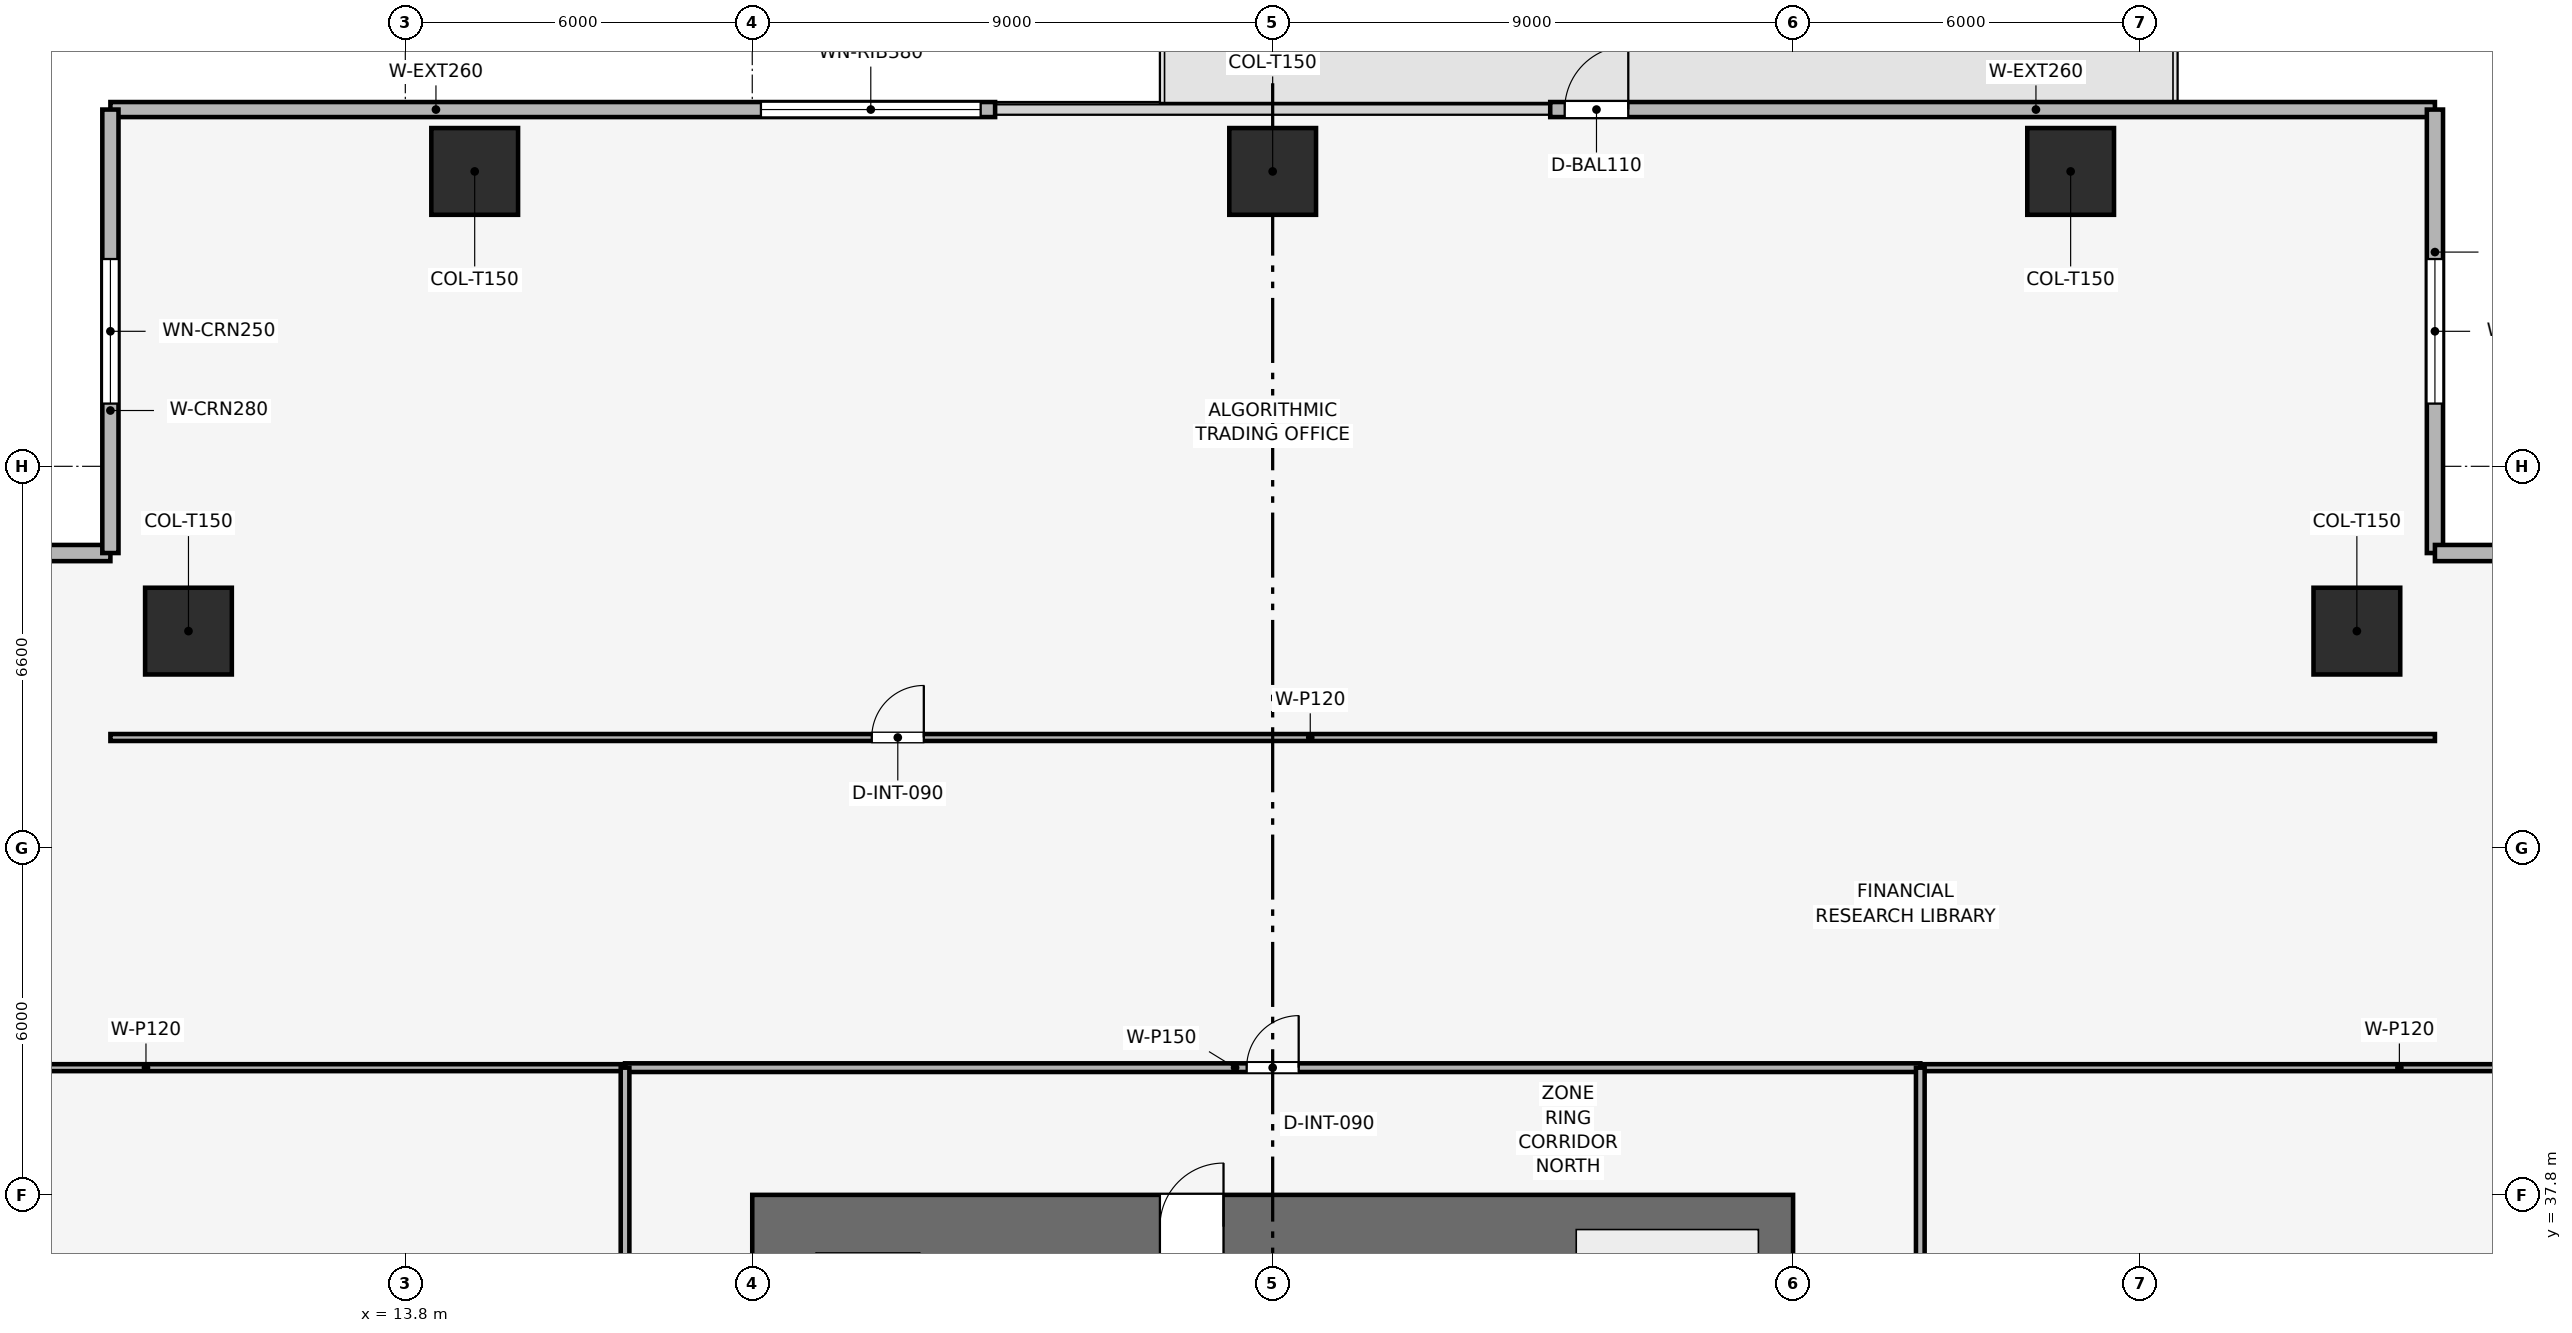
"""IFC4 building model, lengths in metres.
Left out: names, types, materials, properties, quantities, classifications, styles, units other than length and angle.
Written with IfcOpenShell. Run it as: python <this file> out.ifc"""

import sys

from ifc_helpers import new_model, si_unit, direction, frame, frame_2d, origin, origin_2d, place, context, subcontext, project, spatial, rectangle, extrude, element, fill, save


model = new_model("IFC4")
c1 = context("Model", 3, precision=1e-05, world=origin(), true_north=direction((0.0, 1.0)))
c2 = subcontext(c1, "Body", "Model", "MODEL_VIEW")
j1 = project(units=[si_unit("LENGTHUNIT", "METRE"), si_unit("PLANEANGLEUNIT", "RADIAN")], contexts=[c1])
p1 = place(None, origin())
s1 = spatial("IfcSite", under=j1, at=p1, CompositionType="ELEMENT")
p2 = place(p1, origin())
s2 = spatial("IfcBuilding", under=s1, at=p2, CompositionType="ELEMENT")
p3 = place(p2, frame((0.0, 0.0, 65.1)))
s3 = spatial("IfcBuildingStorey", under=s2, at=p3, CompositionType="ELEMENT", Elevation=65.1)
p4 = place(p3, frame((19.8, 37.25, 0.0), z_axis=(0.0, 0.0, 1.0), x_axis=(1.0, 0.0, 0.0)))
e1 = element("IfcWall", 1, at=p4, inside=s3, PredefinedType="SHEAR", context=c2, shape_type="SweptSolid", body=[
    extrude(rectangle(XDim=18.0, YDim=1.1, at=frame_2d((9.0, 0.0))), origin(), (0.0, 0.0, 1.0), 3.9),
])
p5 = place(p4, frame((7.05, 0.0, 0.0)))
e2 = element("IfcOpeningElement", 2, at=p5, cuts=e1, PredefinedType="OPENING", context=c2, shape_type="SweptSolid", body=[
    extrude(rectangle(XDim=1.1, YDim=2.15, at=frame_2d((0.55, 1.075))), frame((0.0, 0.56, 0.0), z_axis=(0.0, -1.0, 0.0), x_axis=(1.0, 0.0, 0.0)), (0.0, 0.0, 1.0), 1.12),
])
for number, where, z_axis, x_axis in (
    (3, (42.6, 55.5, 0.003), (0.0, 0.0, 1.0), (1.0, 0.0, 0.0)),
    (4, (28.8, 55.5, 0.003), (0.0, 0.0, 1.0), (1.0, 0.0, 0.0)),
    (5, (15.0, 55.5, 0.003), (0.0, 0.0, 1.0), (1.0, 0.0, 0.0)),
    (6, (47.55, 47.55, 0.003), (0.0, 0.0, 1.0), (1.0, 0.0, 0.0)),
    (7, (10.05, 47.55, 0.003), (0.0, 0.0, 1.0), (1.0, 0.0, 0.0)),
):
    element("IfcColumn", number, at=place(p3, frame(where, z_axis=z_axis, x_axis=x_axis)), inside=s3, PredefinedType="COLUMN", context=c2, shape_type="SweptSolid", body=[
        extrude(rectangle(XDim=1.5, YDim=1.5, at=origin_2d()), origin(), (0.0, 0.0, 1.0), 3.644),
    ])
p6 = place(p3, frame((8.7, 56.57, 0.0), z_axis=(0.0, 0.0, 1.0), x_axis=(1.0, 0.0, 0.0)))
e8 = element("IfcWall", 8, at=p6, inside=s3, PredefinedType="SOLIDWALL", context=c2, shape_type="SweptSolid", body=[
    extrude(rectangle(XDim=15.3, YDim=0.26, at=frame_2d((7.65, 0.0))), origin(), (0.0, 0.0, 1.0), 3.65),
])
p7 = place(p6, frame((11.25, 0.0, 0.9)))
e9 = element("IfcOpeningElement", 9, at=p7, cuts=e8, PredefinedType="OPENING", context=c2, shape_type="SweptSolid", body=[
    extrude(rectangle(XDim=3.8, YDim=1.9, at=frame_2d((1.9, 0.95))), frame((0.0, 0.14, 0.0), z_axis=(0.0, -1.0, 0.0), x_axis=(1.0, 0.0, 0.0)), (0.0, 0.0, 1.0), 0.28),
])
p8 = place(p3, frame((33.6, 56.57, 0.0), z_axis=(0.0, 0.0, 1.0), x_axis=(1.0, 0.0, 0.0)))
e10 = element("IfcWall", 10, at=p8, inside=s3, PredefinedType="SOLIDWALL", context=c2, shape_type="SweptSolid", body=[
    extrude(rectangle(XDim=15.3, YDim=0.26, at=frame_2d((7.65, 0.0))), origin(), (0.0, 0.0, 1.0), 3.65),
])
p9 = place(p8, frame((0.25, 0.0, 0.0)))
e11 = element("IfcOpeningElement", 11, at=p9, cuts=e10, PredefinedType="OPENING", context=c2, shape_type="SweptSolid", body=[
    extrude(rectangle(XDim=1.1, YDim=2.2, at=frame_2d((0.55, 1.1))), frame((0.0, 0.14, 0.0), z_axis=(0.0, -1.0, 0.0), x_axis=(1.0, 0.0, 0.0)), (0.0, 0.0, 1.0), 0.28),
])
p10 = place(p3, frame((1.03, 48.9, 0.0), z_axis=(0.0, 0.0, 1.0), x_axis=(1.0, 0.0, 0.0)))
e12 = element("IfcWall", 12, at=p10, inside=s3, PredefinedType="SOLIDWALL", context=c2, shape_type="SweptSolid", body=[
    extrude(rectangle(XDim=7.67, YDim=0.28, at=frame_2d((3.835, 0.0))), origin(), (0.0, 0.0, 1.0), 3.65),
])
p11 = place(p10, frame((2.585, 0.0, 0.9)))
e13 = element("IfcOpeningElement", 13, at=p11, cuts=e12, PredefinedType="OPENING", context=c2, shape_type="SweptSolid", body=[
    extrude(rectangle(XDim=2.5, YDim=1.9, at=frame_2d((1.25, 0.95))), frame((0.0, 0.15, 0.0), z_axis=(0.0, -1.0, 0.0), x_axis=(1.0, 0.0, 0.0)), (0.0, 0.0, 1.0), 0.3),
])
p12 = place(p3, frame((8.7, 48.9, 0.0), z_axis=(0.0, 0.0, 1.0), x_axis=(0.0, 1.0, 0.0)))
e14 = element("IfcWall", 14, at=p12, inside=s3, PredefinedType="SOLIDWALL", context=c2, shape_type="SweptSolid", body=[
    extrude(rectangle(XDim=7.67, YDim=0.28, at=frame_2d((3.835, 0.0))), origin(), (0.0, 0.0, 1.0), 3.65),
])
p13 = place(p12, frame((2.585, 0.0, 0.9)))
e15 = element("IfcOpeningElement", 15, at=p13, cuts=e14, PredefinedType="OPENING", context=c2, shape_type="SweptSolid", body=[
    extrude(rectangle(XDim=2.5, YDim=1.9, at=frame_2d((1.25, 0.95))), frame((0.0, 0.15, 0.0), z_axis=(0.0, -1.0, 0.0), x_axis=(1.0, 0.0, 0.0)), (0.0, 0.0, 1.0), 0.3),
])
p14 = place(p3, frame((48.9, 56.57, 0.0), z_axis=(0.0, 0.0, 1.0), x_axis=(0.0, -1.0, 0.0)))
e16 = element("IfcWall", 16, at=p14, inside=s3, PredefinedType="SOLIDWALL", context=c2, shape_type="SweptSolid", body=[
    extrude(rectangle(XDim=7.67, YDim=0.28, at=frame_2d((3.835, 0.0))), origin(), (0.0, 0.0, 1.0), 3.65),
])
p15 = place(p14, frame((2.585, 0.0, 0.9)))
e17 = element("IfcOpeningElement", 17, at=p15, cuts=e16, PredefinedType="OPENING", context=c2, shape_type="SweptSolid", body=[
    extrude(rectangle(XDim=2.5, YDim=1.9, at=frame_2d((1.25, 0.95))), frame((0.0, 0.15, 0.0), z_axis=(0.0, -1.0, 0.0), x_axis=(1.0, 0.0, 0.0)), (0.0, 0.0, 1.0), 0.3),
])
p16 = place(p3, frame((48.9, 48.9, 0.0), z_axis=(0.0, 0.0, 1.0), x_axis=(1.0, 0.0, 0.0)))
e18 = element("IfcWall", 18, at=p16, inside=s3, PredefinedType="SOLIDWALL", context=c2, shape_type="SweptSolid", body=[
    extrude(rectangle(XDim=7.67, YDim=0.28, at=frame_2d((3.835, 0.0))), origin(), (0.0, 0.0, 1.0), 3.65),
])
p17 = place(p16, frame((2.585, 0.0, 0.9)))
e19 = element("IfcOpeningElement", 19, at=p17, cuts=e18, PredefinedType="OPENING", context=c2, shape_type="SweptSolid", body=[
    extrude(rectangle(XDim=2.5, YDim=1.9, at=frame_2d((1.25, 0.95))), frame((0.0, 0.15, 0.0), z_axis=(0.0, -1.0, 0.0), x_axis=(1.0, 0.0, 0.0)), (0.0, 0.0, 1.0), 0.3),
])
p18 = place(p3, frame((8.7, 45.71, 0.0), z_axis=(0.0, 0.0, 1.0), x_axis=(1.0, 0.0, 0.0)))
e20 = element("IfcWall", 20, at=p18, inside=s3, PredefinedType="PARTITIONING", context=c2, shape_type="SweptSolid", body=[
    extrude(rectangle(XDim=40.2, YDim=0.12, at=frame_2d((20.1, 0.0))), origin(), (0.0, 0.0, 1.0), 3.085),
])
p19 = place(p18, frame((13.167, 0.0, 0.0)))
e21 = element("IfcOpeningElement", 21, at=p19, cuts=e20, PredefinedType="OPENING", context=c2, shape_type="SweptSolid", body=[
    extrude(rectangle(XDim=0.9, YDim=2.1, at=frame_2d((0.45, 1.05))), frame((0.0, 0.07, 0.0), z_axis=(0.0, -1.0, 0.0), x_axis=(1.0, 0.0, 0.0)), (0.0, 0.0, 1.0), 0.14),
])
for number, where, z_axis, x_axis in (
    (22, (1.03, 40.0, 0.0), (0.0, 0.0, 1.0), (1.0, 0.0, 0.0)),
    (23, (40.0, 40.0, 0.0), (0.0, 0.0, 1.0), (1.0, 0.0, 0.0)),
):
    element("IfcWall", number, at=place(p3, frame(where, z_axis=z_axis, x_axis=x_axis)), inside=s3, PredefinedType="PARTITIONING", context=c2, shape_type="SweptSolid", body=[
        extrude(rectangle(XDim=16.57, YDim=0.12, at=frame_2d((8.285, 0.0))), origin(), (0.0, 0.0, 1.0), 2.935),
    ])
p20 = place(p3, frame((17.6, 40.0, 0.0), z_axis=(0.0, 0.0, 1.0), x_axis=(1.0, 0.0, 0.0)))
e24 = element("IfcWall", 24, at=p20, inside=s3, PredefinedType="PARTITIONING", context=c2, shape_type="SweptSolid", body=[
    extrude(rectangle(XDim=22.4, YDim=0.15, at=frame_2d((11.2, 0.0))), origin(), (0.0, 0.0, 1.0), 3.085),
])
p21 = place(p20, frame((10.75, 0.0, 0.0)))
e25 = element("IfcOpeningElement", 25, at=p21, cuts=e24, PredefinedType="OPENING", context=c2, shape_type="SweptSolid", body=[
    extrude(rectangle(XDim=0.9, YDim=2.1, at=frame_2d((0.45, 1.05))), frame((0.0, 0.085, 0.0), z_axis=(0.0, -1.0, 0.0), x_axis=(1.0, 0.0, 0.0)), (0.0, 0.0, 1.0), 0.17),
])
p22 = place(p3, frame((17.6, 17.6, 0.0), z_axis=(0.0, 0.0, 1.0), x_axis=(0.0, 1.0, 0.0)))
e26 = element("IfcWall", 26, at=p22, inside=s3, PredefinedType="PARTITIONING", context=c2, shape_type="SweptSolid", body=[
    extrude(rectangle(XDim=22.4, YDim=0.15, at=frame_2d((11.2, 0.0))), origin(), (0.0, 0.0, 1.0), 3.085),
])
p23 = place(p22, frame((0.7, 0.0, 0.0)))
e27 = element("IfcOpeningElement", 27, at=p23, cuts=e26, PredefinedType="OPENING", context=c2, shape_type="SweptSolid", body=[
    extrude(rectangle(XDim=0.9, YDim=2.1, at=frame_2d((0.45, 1.05))), frame((0.0, 0.085, 0.0), z_axis=(0.0, -1.0, 0.0), x_axis=(1.0, 0.0, 0.0)), (0.0, 0.0, 1.0), 0.17),
])
p24 = place(p22, frame((6.365, 0.0, 0.0)))
e28 = element("IfcOpeningElement", 28, at=p24, cuts=e26, PredefinedType="OPENING", context=c2, shape_type="SweptSolid", body=[
    extrude(rectangle(XDim=0.9, YDim=2.1, at=frame_2d((0.45, 1.05))), frame((0.0, 0.085, 0.0), z_axis=(0.0, -1.0, 0.0), x_axis=(1.0, 0.0, 0.0)), (0.0, 0.0, 1.0), 0.17),
])
p25 = place(p22, frame((16.415, 0.0, 0.0)))
e29 = element("IfcOpeningElement", 29, at=p25, cuts=e26, PredefinedType="OPENING", context=c2, shape_type="SweptSolid", body=[
    extrude(rectangle(XDim=0.9, YDim=2.1, at=frame_2d((0.45, 1.05))), frame((0.0, 0.085, 0.0), z_axis=(0.0, -1.0, 0.0), x_axis=(1.0, 0.0, 0.0)), (0.0, 0.0, 1.0), 0.17),
])
p26 = place(p3, frame((40.0, 17.6, 0.0), z_axis=(0.0, 0.0, 1.0), x_axis=(0.0, 1.0, 0.0)))
e30 = element("IfcWall", 30, at=p26, inside=s3, PredefinedType="PARTITIONING", context=c2, shape_type="SweptSolid", body=[
    extrude(rectangle(XDim=22.4, YDim=0.15, at=frame_2d((11.2, 0.0))), origin(), (0.0, 0.0, 1.0), 3.085),
])
p27 = place(p26, frame((0.7, 0.0, 0.0)))
e31 = element("IfcOpeningElement", 31, at=p27, cuts=e30, PredefinedType="OPENING", context=c2, shape_type="SweptSolid", body=[
    extrude(rectangle(XDim=0.9, YDim=2.1, at=frame_2d((0.45, 1.05))), frame((0.0, 0.085, 0.0), z_axis=(0.0, -1.0, 0.0), x_axis=(1.0, 0.0, 0.0)), (0.0, 0.0, 1.0), 0.17),
])
p28 = place(p26, frame((4.699, 0.0, 0.0)))
e32 = element("IfcOpeningElement", 32, at=p28, cuts=e30, PredefinedType="OPENING", context=c2, shape_type="SweptSolid", body=[
    extrude(rectangle(XDim=0.9, YDim=2.1, at=frame_2d((0.45, 1.05))), frame((0.0, 0.085, 0.0), z_axis=(0.0, -1.0, 0.0), x_axis=(1.0, 0.0, 0.0)), (0.0, 0.0, 1.0), 0.17),
])
p29 = place(p26, frame((10.692, 0.0, 0.0)))
e33 = element("IfcOpeningElement", 33, at=p29, cuts=e30, PredefinedType="OPENING", context=c2, shape_type="SweptSolid", body=[
    extrude(rectangle(XDim=0.9, YDim=2.1, at=frame_2d((0.45, 1.05))), frame((0.0, 0.085, 0.0), z_axis=(0.0, -1.0, 0.0), x_axis=(1.0, 0.0, 0.0)), (0.0, 0.0, 1.0), 0.17),
])
p30 = place(p26, frame((17.892, 0.0, 0.0)))
e34 = element("IfcOpeningElement", 34, at=p30, cuts=e30, PredefinedType="OPENING", context=c2, shape_type="SweptSolid", body=[
    extrude(rectangle(XDim=0.9, YDim=2.1, at=frame_2d((0.45, 1.05))), frame((0.0, 0.085, 0.0), z_axis=(0.0, -1.0, 0.0), x_axis=(1.0, 0.0, 0.0)), (0.0, 0.0, 1.0), 0.17),
])
p31 = place(p9, origin())
e35 = element("IfcDoor", 35, at=p31, inside=s3, OperationType="SINGLE_SWING_RIGHT", PredefinedType="DOOR", context=c2, shape_type="SweptSolid", body=[
    extrude(rectangle(XDim=1.1, YDim=2.2, at=frame_2d((0.55, 1.1))), frame((0.0, 0.025, 0.0), z_axis=(0.0, -1.0, 0.0), x_axis=(1.0, 0.0, 0.0)), (0.0, 0.0, 1.0), 0.05),
])
fill(e11, e35)
p32 = place(p7, origin())
e36 = element("IfcWindow", 36, at=p32, inside=s3, PartitioningType="SINGLE_PANEL", PredefinedType="WINDOW", context=c2, shape_type="SweptSolid", body=[
    extrude(rectangle(XDim=3.8, YDim=1.9, at=frame_2d((1.9, 0.95))), frame((0.0, 0.03, 0.0), z_axis=(0.0, -1.0, 0.0), x_axis=(1.0, 0.0, 0.0)), (0.0, 0.0, 1.0), 0.06),
])
fill(e9, e36)
p33 = place(p13, origin())
e37 = element("IfcWindow", 37, at=p33, inside=s3, PartitioningType="SINGLE_PANEL", PredefinedType="WINDOW", context=c2, shape_type="SweptSolid", body=[
    extrude(rectangle(XDim=2.5, YDim=1.9, at=frame_2d((1.25, 0.95))), frame((0.0, 0.03, 0.0), z_axis=(0.0, -1.0, 0.0), x_axis=(1.0, 0.0, 0.0)), (0.0, 0.0, 1.0), 0.06),
])
fill(e15, e37)
p34 = place(p15, origin())
e38 = element("IfcWindow", 38, at=p34, inside=s3, PartitioningType="SINGLE_PANEL", PredefinedType="WINDOW", context=c2, shape_type="SweptSolid", body=[
    extrude(rectangle(XDim=2.5, YDim=1.9, at=frame_2d((1.25, 0.95))), frame((0.0, 0.03, 0.0), z_axis=(0.0, -1.0, 0.0), x_axis=(1.0, 0.0, 0.0)), (0.0, 0.0, 1.0), 0.06),
])
fill(e17, e38)
p35 = place(p19, origin())
e39 = element("IfcDoor", 39, at=p35, inside=s3, OperationType="SINGLE_SWING_RIGHT", PredefinedType="DOOR", context=c2, shape_type="SweptSolid", body=[
    extrude(rectangle(XDim=0.9, YDim=2.1, at=frame_2d((0.45, 1.05))), frame((0.0, 0.025, 0.0), z_axis=(0.0, -1.0, 0.0), x_axis=(1.0, 0.0, 0.0)), (0.0, 0.0, 1.0), 0.05),
])
fill(e21, e39)
p36 = place(p21, origin())
e40 = element("IfcDoor", 40, at=p36, inside=s3, OperationType="SINGLE_SWING_RIGHT", PredefinedType="DOOR", context=c2, shape_type="SweptSolid", body=[
    extrude(rectangle(XDim=0.9, YDim=2.1, at=frame_2d((0.45, 1.05))), frame((0.0, 0.025, 0.0), z_axis=(0.0, -1.0, 0.0), x_axis=(1.0, 0.0, 0.0)), (0.0, 0.0, 1.0), 0.05),
])
fill(e25, e40)
p37 = place(p5, origin())
e41 = element("IfcDoor", 41, at=p37, inside=s3, OperationType="SINGLE_SWING_RIGHT", PredefinedType="DOOR", context=c2, shape_type="SweptSolid", body=[
    extrude(rectangle(XDim=1.1, YDim=2.15, at=frame_2d((0.55, 1.075))), frame((0.0, 0.025, 0.0), z_axis=(0.0, -1.0, 0.0), x_axis=(1.0, 0.0, 0.0)), (0.0, 0.0, 1.0), 0.05),
])
fill(e2, e41)
save(model, sys.argv[1])
